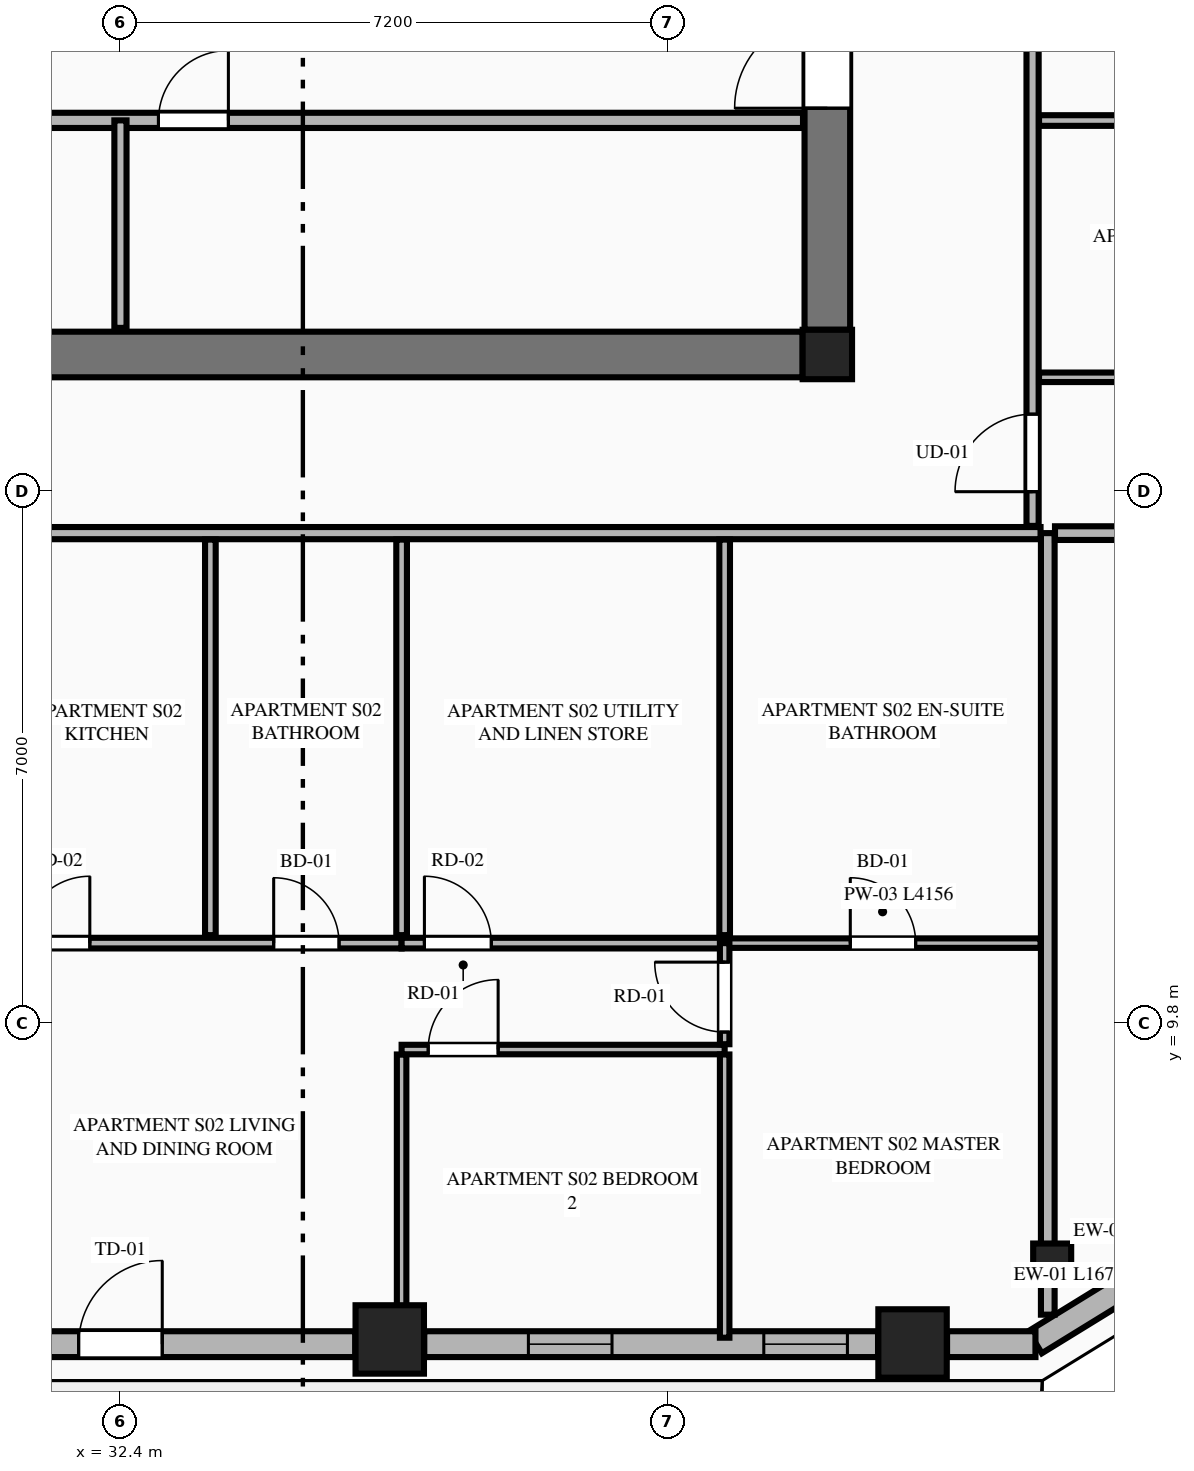
"""IFC4 building model, lengths in metres.
Left out: names, types, materials, properties, quantities, classifications, styles, units other than length and angle.
Written with IfcOpenShell. Run it as: python <this file> out.ifc"""

import sys

from ifc_helpers import new_model, si_unit, direction, frame, frame_2d, origin, origin_2d, place, context, subcontext, project, spatial, rectangle, extrude, element, fill, save


model = new_model("IFC4")
c1 = context("Model", 3, precision=1e-05, world=origin(), true_north=direction((0.0, 1.0)))
c2 = subcontext(c1, "Body", "Model", "MODEL_VIEW")
j1 = project(units=[si_unit("LENGTHUNIT", "METRE"), si_unit("PLANEANGLEUNIT", "RADIAN")], contexts=[c1])
p1 = place(None, origin())
s1 = spatial("IfcSite", under=j1, at=p1, CompositionType="ELEMENT")
p2 = place(p1, origin())
s2 = spatial("IfcBuilding", under=s1, at=p2, CompositionType="ELEMENT")
p3 = place(p2, frame((0.0, 0.0, 175.45)))
s3 = spatial("IfcBuildingStorey", under=s2, at=p3, CompositionType="ELEMENT", Elevation=175.45)
p4 = place(p3, frame((41.7, 18.6, 0.0), z_axis=(0.0, 0.0, 1.0), x_axis=(1.0, 0.0, 0.0)))
e1 = element("IfcColumn", 1, at=p4, inside=s3, PredefinedType="COLUMN", context=c2, shape_type="SweptSolid", body=[
    extrude(rectangle(XDim=0.65, YDim=0.65, at=origin_2d()), origin(), (0.0, 0.0, 1.0), 3.55),
])
p5 = place(p3, frame((23.425, 18.6, 0.0), z_axis=(0.0, 0.0, 1.0), x_axis=(1.0, 0.0, 0.0)))
e2 = element("IfcWall", 2, at=p5, inside=s3, PredefinedType="SHEAR", context=c2, shape_type="SweptSolid", body=[
    extrude(rectangle(XDim=17.95, YDim=0.6, at=frame_2d((8.975, 0.0))), origin(), (0.0, 0.0, 1.0), 3.35),
])
p6 = place(p3, frame((41.7, 18.925, 0.0), z_axis=(0.0, 0.0, 1.0), x_axis=(0.0, 1.0, 0.0)))
e3 = element("IfcWall", 3, at=p6, inside=s3, PredefinedType="SHEAR", context=c2, shape_type="SweptSolid", body=[
    extrude(rectangle(XDim=13.95, YDim=0.6, at=frame_2d((6.975, 0.0))), origin(), (0.0, 0.0, 1.0), 3.35),
])
p7 = place(p6, frame((2.915, 0.0, 0.0)))
e4 = element("IfcOpeningElement", 4, at=p7, cuts=e3, PredefinedType="OPENING", context=c2, shape_type="SweptSolid", body=[
    extrude(rectangle(XDim=1.22, YDim=2.25, at=frame_2d((0.61, 1.125))), frame((0.0, 0.31, 0.0), z_axis=(0.0, -1.0, 0.0), x_axis=(1.0, 0.0, 0.0)), (0.0, 0.0, 1.0), 0.62),
])
for number, where, z_axis, x_axis in (
    (5, (35.943, 5.642, 0.0), (0.0, 0.0, 1.0), (1.0, 0.0, 0.0)),
    (6, (42.821, 5.589, 0.0), (0.0, 0.0, 1.0), (1.0, 0.0, 0.0)),
):
    element("IfcColumn", number, at=place(p3, frame(where, z_axis=z_axis, x_axis=x_axis)), inside=s3, PredefinedType="COLUMN", context=c2, shape_type="SweptSolid", body=[
        extrude(rectangle(XDim=0.9, YDim=0.9, at=origin_2d()), origin(), (0.0, 0.0, 1.0), 3.55),
    ])
p8 = place(p3, frame((44.658, 6.654, 0.0), z_axis=(0.0, 0.0, 1.0), x_axis=(0.865230187018, 0.501374833306, 0.0)))
e7 = element("IfcColumn", 7, at=p8, inside=s3, PredefinedType="PILASTER", context=c2, shape_type="SweptSolid", body=[
    extrude(rectangle(XDim=0.5, YDim=0.35, at=origin_2d()), origin(), (0.0, 0.0, 1.0), 3.55),
])
p9 = place(p3, frame((23.42, 21.68, 0.0), z_axis=(0.0, 0.0, 1.0), x_axis=(1.0, 0.0, 0.0)))
e8 = element("IfcWall", 8, at=p9, inside=s3, PredefinedType="PLUMBINGWALL", context=c2, shape_type="SweptSolid", body=[
    extrude(rectangle(XDim=17.96, YDim=0.2, at=frame_2d((8.98, 0.0))), origin(), (0.0, 0.0, 1.0), 3.35),
])
p10 = place(p9, frame((0.46, 0.0, 0.0)))
e9 = element("IfcOpeningElement", 9, at=p10, cuts=e8, PredefinedType="OPENING", context=c2, shape_type="SweptSolid", body=[
    extrude(rectangle(XDim=0.92, YDim=2.15, at=frame_2d((0.46, 1.075))), frame((0.0, 0.11, 0.0), z_axis=(0.0, -1.0, 0.0), x_axis=(1.0, 0.0, 0.0)), (0.0, 0.0, 1.0), 0.22),
])
p11 = place(p9, frame((9.48, 0.0, 0.0)))
e10 = element("IfcOpeningElement", 10, at=p11, cuts=e8, PredefinedType="OPENING", context=c2, shape_type="SweptSolid", body=[
    extrude(rectangle(XDim=0.92, YDim=2.15, at=frame_2d((0.46, 1.075))), frame((0.0, 0.11, 0.0), z_axis=(0.0, -1.0, 0.0), x_axis=(1.0, 0.0, 0.0)), (0.0, 0.0, 1.0), 0.22),
])
p12 = place(p3, frame((32.4, 18.95, 0.0), z_axis=(0.0, 0.0, 1.0), x_axis=(0.0, 1.0, 0.0)))
e11 = element("IfcWall", 11, at=p12, inside=s3, PredefinedType="PARTITIONING", context=c2, shape_type="SweptSolid", body=[
    extrude(rectangle(XDim=2.73, YDim=0.16, at=frame_2d((1.365, 0.0))), origin(), (0.0, 0.0, 1.0), 3.35),
])
p13 = place(p3, frame((44.433, 5.605, 0.0), z_axis=(0.0, 0.0, 1.0), x_axis=(0.851778214877, 0.523902541185, 0.0)))
e12 = element("IfcWall", 12, at=p13, inside=s3, PredefinedType="STANDARD", context=c2, shape_type="SweptSolid", body=[
    extrude(rectangle(XDim=1.678, YDim=0.34, at=frame_2d((0.839, 0.0))), origin(), (0.0, 0.0, 1.0), 3.35),
])
p14 = place(p3, frame((29.311, 5.58, 0.0), z_axis=(0.0, 0.0, 1.0), x_axis=(1.0, 0.0, 0.0)))
e13 = element("IfcWall", 13, at=p14, inside=s3, PredefinedType="STANDARD", context=c2, shape_type="SweptSolid", body=[
    extrude(rectangle(XDim=6.178, YDim=0.34, at=frame_2d((3.089, 0.0))), origin(), (0.0, 0.0, 1.0), 2.883),
])
p15 = place(p14, frame((2.539, 0.0, 0.0)))
e14 = element("IfcOpeningElement", 14, at=p15, cuts=e13, PredefinedType="OPENING", context=c2, shape_type="SweptSolid", body=[
    extrude(rectangle(XDim=1.1, YDim=2.25, at=frame_2d((0.55, 1.125))), frame((0.0, 0.18, 0.0), z_axis=(0.0, -1.0, 0.0), x_axis=(1.0, 0.0, 0.0)), (0.0, 0.0, 1.0), 0.36),
])
p16 = place(p3, frame((36.397, 5.58, 0.0), z_axis=(0.0, 0.0, 1.0), x_axis=(1.0, 0.0, 0.0)))
e15 = element("IfcWall", 15, at=p16, inside=s3, PredefinedType="STANDARD", context=c2, shape_type="SweptSolid", body=[
    extrude(rectangle(XDim=5.97, YDim=0.34, at=frame_2d((2.985, 0.0))), origin(), (0.0, 0.0, 1.0), 2.883),
])
p17 = place(p16, frame((1.37, 0.0, 0.75)))
e16 = element("IfcOpeningElement", 16, at=p17, cuts=e15, PredefinedType="OPENING", context=c2, shape_type="SweptSolid", body=[
    extrude(rectangle(XDim=1.1, YDim=1.983, at=frame_2d((0.55, 0.991))), frame((0.0, 0.18, 0.0), z_axis=(0.0, -1.0, 0.0), x_axis=(1.0, 0.0, 0.0)), (0.0, 0.0, 1.0), 0.36),
])
p18 = place(p16, frame((4.467, 0.0, 0.75)))
e17 = element("IfcOpeningElement", 17, at=p18, cuts=e15, PredefinedType="OPENING", context=c2, shape_type="SweptSolid", body=[
    extrude(rectangle(XDim=1.1, YDim=1.983, at=frame_2d((0.55, 0.991))), frame((0.0, 0.18, 0.0), z_axis=(0.0, -1.0, 0.0), x_axis=(1.0, 0.0, 0.0)), (0.0, 0.0, 1.0), 0.36),
])
p19 = place(p3, frame((43.275, 5.58, 0.0), z_axis=(0.0, 0.0, 1.0), x_axis=(1.0, 0.0, 0.0)))
e18 = element("IfcWall", 18, at=p19, inside=s3, PredefinedType="STANDARD", context=c2, shape_type="SweptSolid", body=[
    extrude(rectangle(XDim=1.163, YDim=0.34, at=frame_2d((0.582, 0.0))), origin(), (0.0, 0.0, 1.0), 3.35),
])
p20 = place(p3, frame((44.6, 5.968, 0.0), z_axis=(0.0, 0.0, 1.0), x_axis=(0.0, 1.0, 0.0)))
e19 = element("IfcWall", 19, at=p20, inside=s3, PredefinedType="PARTITIONING", context=c2, shape_type="SweptSolid", body=[
    extrude(rectangle(XDim=10.282, YDim=0.18, at=frame_2d((5.141, 0.0))), origin(), (0.0, 0.0, 1.0), 3.35),
])
p21 = place(p3, frame((28.952, 16.25, 0.0), z_axis=(0.0, 0.0, 1.0), x_axis=(1.0, 0.0, 0.0)))
e20 = element("IfcWall", 20, at=p21, inside=s3, PredefinedType="PARTITIONING", context=c2, shape_type="SweptSolid", body=[
    extrude(rectangle(XDim=15.553, YDim=0.16, at=frame_2d((7.776, 0.0))), origin(), (0.0, 0.0, 1.0), 3.35),
])
p22 = place(p21, frame((0.355, 0.0, 0.0)))
e21 = element("IfcOpeningElement", 21, at=p22, cuts=e20, PredefinedType="OPENING", context=c2, shape_type="SweptSolid", body=[
    extrude(rectangle(XDim=1.02, YDim=2.25, at=frame_2d((0.51, 1.125))), frame((0.0, 0.09, 0.0), z_axis=(0.0, -1.0, 0.0), x_axis=(1.0, 0.0, 0.0)), (0.0, 0.0, 1.0), 0.18),
])
p23 = place(p3, frame((30.857, 10.856, 0.0), z_axis=(0.0, 0.0, 1.0), x_axis=(1.0, 0.0, 0.0)))
e22 = element("IfcWall", 22, at=p23, inside=s3, PredefinedType="PLUMBINGWALL", context=c2, shape_type="SweptSolid", body=[
    extrude(rectangle(XDim=5.242, YDim=0.14, at=frame_2d((2.621, 0.0))), origin(), (0.0, 0.0, 1.0), 3.35),
])
p24 = place(p23, frame((3.559, 0.0, 0.0)))
e23 = element("IfcOpeningElement", 23, at=p24, cuts=e22, PredefinedType="OPENING", context=c2, shape_type="SweptSolid", body=[
    extrude(rectangle(XDim=0.86, YDim=2.1, at=frame_2d((0.43, 1.05))), frame((0.0, 0.08, 0.0), z_axis=(0.0, -1.0, 0.0), x_axis=(1.0, 0.0, 0.0)), (0.0, 0.0, 1.0), 0.16),
])
p25 = place(p23, frame((0.26, 0.0, 0.0)))
e24 = element("IfcOpeningElement", 24, at=p25, cuts=e22, PredefinedType="OPENING", context=c2, shape_type="SweptSolid", body=[
    extrude(rectangle(XDim=0.88, YDim=2.15, at=frame_2d((0.44, 1.075))), frame((0.0, 0.08, 0.0), z_axis=(0.0, -1.0, 0.0), x_axis=(1.0, 0.0, 0.0)), (0.0, 0.0, 1.0), 0.16),
])
p26 = place(p3, frame((36.099, 10.856, 0.0), z_axis=(0.0, 0.0, 1.0), x_axis=(1.0, 0.0, 0.0)))
e25 = element("IfcWall", 25, at=p26, inside=s3, PredefinedType="PLUMBINGWALL", context=c2, shape_type="SweptSolid", body=[
    extrude(rectangle(XDim=4.25, YDim=0.14, at=frame_2d((2.125, 0.0))), origin(), (0.0, 0.0, 1.0), 3.35),
])
p27 = place(p26, frame((0.3, 0.0, 0.0)))
e26 = element("IfcOpeningElement", 26, at=p27, cuts=e25, PredefinedType="OPENING", context=c2, shape_type="SweptSolid", body=[
    extrude(rectangle(XDim=0.88, YDim=2.15, at=frame_2d((0.44, 1.075))), frame((0.0, 0.08, 0.0), z_axis=(0.0, -1.0, 0.0), x_axis=(1.0, 0.0, 0.0)), (0.0, 0.0, 1.0), 0.16),
])
p28 = place(p3, frame((40.349, 10.856, 0.0), z_axis=(0.0, 0.0, 1.0), x_axis=(1.0, 0.0, 0.0)))
e27 = element("IfcWall", 27, at=p28, inside=s3, PredefinedType="PARTITIONING", context=c2, shape_type="SweptSolid", body=[
    extrude(rectangle(XDim=4.156, YDim=0.125, at=frame_2d((2.078, 0.0))), origin(), (0.0, 0.0, 1.0), 3.35),
])
p29 = place(p28, frame((1.653, 0.0, 0.0)))
e28 = element("IfcOpeningElement", 28, at=p29, cuts=e27, PredefinedType="OPENING", context=c2, shape_type="SweptSolid", body=[
    extrude(rectangle(XDim=0.86, YDim=2.1, at=frame_2d((0.43, 1.05))), frame((0.0, 0.073, 0.0), z_axis=(0.0, -1.0, 0.0), x_axis=(1.0, 0.0, 0.0)), (0.0, 0.0, 1.0), 0.145),
])
p30 = place(p3, frame((33.583, 10.961, 0.0), z_axis=(0.0, 0.0, 1.0), x_axis=(0.0, 1.0, 0.0)))
e29 = element("IfcWall", 29, at=p30, inside=s3, PredefinedType="PLUMBINGWALL", context=c2, shape_type="SweptSolid", body=[
    extrude(rectangle(XDim=5.204, YDim=0.14, at=frame_2d((2.602, 0.0))), origin(), (0.0, 0.0, 1.0), 3.35),
])
p31 = place(p3, frame((36.099, 5.665, 0.0), z_axis=(0.0, 0.0, 1.0), x_axis=(0.0, 1.0, 0.0)))
e30 = element("IfcWall", 30, at=p31, inside=s3, PredefinedType="PARTITIONING", context=c2, shape_type="SweptSolid", body=[
    extrude(rectangle(XDim=3.726, YDim=0.125, at=frame_2d((1.863, 0.0))), origin(), (0.0, 0.0, 1.0), 3.35),
])
p32 = place(p3, frame((36.099, 9.456, 0.0), z_axis=(0.0, 0.0, 1.0), x_axis=(1.0, 0.0, 0.0)))
e31 = element("IfcWall", 31, at=p32, inside=s3, PredefinedType="PARTITIONING", context=c2, shape_type="SweptSolid", body=[
    extrude(rectangle(XDim=4.25, YDim=0.125, at=frame_2d((2.125, 0.0))), origin(), (0.0, 0.0, 1.0), 3.35),
])
p33 = place(p32, frame((0.35, 0.0, 0.0)))
e32 = element("IfcOpeningElement", 32, at=p33, cuts=e31, PredefinedType="OPENING", context=c2, shape_type="SweptSolid", body=[
    extrude(rectangle(XDim=0.92, YDim=2.15, at=frame_2d((0.46, 1.075))), frame((0.0, 0.073, 0.0), z_axis=(0.0, -1.0, 0.0), x_axis=(1.0, 0.0, 0.0)), (0.0, 0.0, 1.0), 0.145),
])
p34 = place(p3, frame((40.349, 9.526, 0.0), z_axis=(0.0, 0.0, 1.0), x_axis=(0.0, 1.0, 0.0)))
e33 = element("IfcWall", 33, at=p34, inside=s3, PredefinedType="PARTITIONING", context=c2, shape_type="SweptSolid", body=[
    extrude(rectangle(XDim=1.33, YDim=0.125, at=frame_2d((0.665, 0.0))), origin(), (0.0, 0.0, 1.0), 3.35),
])
p35 = place(p34, frame((0.16, 0.0, 0.0)))
e34 = element("IfcOpeningElement", 34, at=p35, cuts=e33, PredefinedType="OPENING", context=c2, shape_type="SweptSolid", body=[
    extrude(rectangle(XDim=0.92, YDim=2.15, at=frame_2d((0.46, 1.075))), frame((0.0, 0.073, 0.0), z_axis=(0.0, -1.0, 0.0), x_axis=(1.0, 0.0, 0.0)), (0.0, 0.0, 1.0), 0.145),
])
for number, where, z_axis, x_axis in (
    (35, (36.099, 10.961, 0.0), (0.0, 0.0, 1.0), (0.0, 1.0, 0.0)),
    (36, (40.349, 10.961, 0.0), (0.0, 0.0, 1.0), (0.0, 1.0, 0.0)),
):
    element("IfcWall", number, at=place(p3, frame(where, z_axis=z_axis, x_axis=x_axis)), inside=s3, PredefinedType="PLUMBINGWALL", context=c2, shape_type="SweptSolid", body=[
        extrude(rectangle(XDim=5.204, YDim=0.14, at=frame_2d((2.602, 0.0))), origin(), (0.0, 0.0, 1.0), 3.35),
    ])
p36 = place(p3, frame((40.349, 5.665, 0.0), z_axis=(0.0, 0.0, 1.0), x_axis=(0.0, 1.0, 0.0)))
e37 = element("IfcWall", 37, at=p36, inside=s3, PredefinedType="PARTITIONING", context=c2, shape_type="SweptSolid", body=[
    extrude(rectangle(XDim=3.726, YDim=0.125, at=frame_2d((1.863, 0.0))), origin(), (0.0, 0.0, 1.0), 3.35),
])
p37 = place(p3, frame((44.695, 16.25, 0.0), z_axis=(0.0, 0.0, 1.0), x_axis=(1.0, 0.0, 0.0)))
e38 = element("IfcWall", 38, at=p37, inside=s3, PredefinedType="PARTITIONING", context=c2, shape_type="SweptSolid", body=[
    extrude(rectangle(XDim=5.894, YDim=0.18, at=frame_2d((2.947, 0.0))), origin(), (0.0, 0.0, 1.0), 3.35),
])
p38 = place(p3, frame((44.4, 16.345, 0.0), z_axis=(0.0, 0.0, 1.0), x_axis=(0.0, 1.0, 0.0)))
e39 = element("IfcWall", 39, at=p38, inside=s3, PredefinedType="PARTITIONING", context=c2, shape_type="SweptSolid", body=[
    extrude(rectangle(XDim=18.71, YDim=0.16, at=frame_2d((9.355, 0.0))), origin(), (0.0, 0.0, 1.0), 3.35),
])
p39 = place(p38, frame((0.45, 0.0, 0.0)))
e40 = element("IfcOpeningElement", 40, at=p39, cuts=e39, PredefinedType="OPENING", context=c2, shape_type="SweptSolid", body=[
    extrude(rectangle(XDim=1.02, YDim=2.25, at=frame_2d((0.51, 1.125))), frame((0.0, 0.09, 0.0), z_axis=(0.0, -1.0, 0.0), x_axis=(1.0, 0.0, 0.0)), (0.0, 0.0, 1.0), 0.18),
])
p40 = place(p3, frame((44.485, 18.3, 0.0), z_axis=(0.0, 0.0, 1.0), x_axis=(1.0, 0.0, 0.0)))
e41 = element("IfcWall", 41, at=p40, inside=s3, PredefinedType="PARTITIONING", context=c2, shape_type="SweptSolid", body=[
    extrude(rectangle(XDim=3.68, YDim=0.125, at=frame_2d((1.84, 0.0))), origin(), (0.0, 0.0, 1.0), 2.807),
])
p41 = place(p3, frame((44.485, 21.678, 0.0), z_axis=(0.0, 0.0, 1.0), x_axis=(1.0, 0.0, 0.0)))
e42 = element("IfcWall", 42, at=p41, inside=s3, PredefinedType="PLUMBINGWALL", context=c2, shape_type="SweptSolid", body=[
    extrude(rectangle(XDim=3.68, YDim=0.14, at=frame_2d((1.84, 0.0))), origin(), (0.0, 0.0, 1.0), 3.35),
])
p42 = place(p7, origin())
e43 = element("IfcDoor", 43, at=p42, inside=s3, OperationType="SINGLE_SWING_LEFT", PredefinedType="DOOR", context=c2, shape_type="SweptSolid", body=[
    extrude(rectangle(XDim=1.22, YDim=2.25, at=frame_2d((0.61, 1.125))), frame((0.0, 0.025, 0.0), z_axis=(0.0, -1.0, 0.0), x_axis=(1.0, 0.0, 0.0)), (0.0, 0.0, 1.0), 0.05),
])
fill(e4, e43)
p43 = place(p11, origin())
e44 = element("IfcDoor", 44, at=p43, inside=s3, OperationType="SINGLE_SWING_RIGHT", PredefinedType="DOOR", context=c2, shape_type="SweptSolid", body=[
    extrude(rectangle(XDim=0.92, YDim=2.15, at=frame_2d((0.46, 1.075))), frame((0.0, 0.025, 0.0), z_axis=(0.0, -1.0, 0.0), x_axis=(1.0, 0.0, 0.0)), (0.0, 0.0, 1.0), 0.05),
])
fill(e10, e44)
p44 = place(p15, origin())
e45 = element("IfcDoor", 45, at=p44, inside=s3, OperationType="SINGLE_SWING_RIGHT", PredefinedType="DOOR", context=c2, shape_type="SweptSolid", body=[
    extrude(rectangle(XDim=1.1, YDim=2.25, at=frame_2d((0.55, 1.125))), frame((0.0, 0.025, 0.0), z_axis=(0.0, -1.0, 0.0), x_axis=(1.0, 0.0, 0.0)), (0.0, 0.0, 1.0), 0.05),
])
fill(e14, e45)
p45 = place(p17, origin())
e46 = element("IfcWindow", 46, at=p45, inside=s3, PartitioningType="SINGLE_PANEL", PredefinedType="WINDOW", context=c2, shape_type="SweptSolid", body=[
    extrude(rectangle(XDim=1.1, YDim=1.983, at=frame_2d((0.55, 0.991))), frame((0.0, 0.03, 0.0), z_axis=(0.0, -1.0, 0.0), x_axis=(1.0, 0.0, 0.0)), (0.0, 0.0, 1.0), 0.06),
])
fill(e16, e46)
p46 = place(p24, origin())
e47 = element("IfcDoor", 47, at=p46, inside=s3, OperationType="SINGLE_SWING_LEFT", PredefinedType="DOOR", context=c2, shape_type="SweptSolid", body=[
    extrude(rectangle(XDim=0.86, YDim=2.1, at=frame_2d((0.43, 1.05))), frame((0.0, 0.025, 0.0), z_axis=(0.0, -1.0, 0.0), x_axis=(1.0, 0.0, 0.0)), (0.0, 0.0, 1.0), 0.05),
])
fill(e23, e47)
p47 = place(p29, origin())
e48 = element("IfcDoor", 48, at=p47, inside=s3, OperationType="SINGLE_SWING_LEFT", PredefinedType="DOOR", context=c2, shape_type="SweptSolid", body=[
    extrude(rectangle(XDim=0.86, YDim=2.1, at=frame_2d((0.43, 1.05))), frame((0.0, 0.025, 0.0), z_axis=(0.0, -1.0, 0.0), x_axis=(1.0, 0.0, 0.0)), (0.0, 0.0, 1.0), 0.05),
])
fill(e28, e48)
p48 = place(p25, origin())
e49 = element("IfcDoor", 49, at=p48, inside=s3, OperationType="SINGLE_SWING_RIGHT", PredefinedType="DOOR", context=c2, shape_type="SweptSolid", body=[
    extrude(rectangle(XDim=0.88, YDim=2.15, at=frame_2d((0.44, 1.075))), frame((0.0, 0.025, 0.0), z_axis=(0.0, -1.0, 0.0), x_axis=(1.0, 0.0, 0.0)), (0.0, 0.0, 1.0), 0.05),
])
fill(e24, e49)
p49 = place(p27, origin())
e50 = element("IfcDoor", 50, at=p49, inside=s3, OperationType="SINGLE_SWING_LEFT", PredefinedType="DOOR", context=c2, shape_type="SweptSolid", body=[
    extrude(rectangle(XDim=0.88, YDim=2.15, at=frame_2d((0.44, 1.075))), frame((0.0, 0.025, 0.0), z_axis=(0.0, -1.0, 0.0), x_axis=(1.0, 0.0, 0.0)), (0.0, 0.0, 1.0), 0.05),
])
fill(e26, e50)
p50 = place(p33, origin())
e51 = element("IfcDoor", 51, at=p50, inside=s3, OperationType="SINGLE_SWING_RIGHT", PredefinedType="DOOR", context=c2, shape_type="SweptSolid", body=[
    extrude(rectangle(XDim=0.92, YDim=2.15, at=frame_2d((0.46, 1.075))), frame((0.0, 0.025, 0.0), z_axis=(0.0, -1.0, 0.0), x_axis=(1.0, 0.0, 0.0)), (0.0, 0.0, 1.0), 0.05),
])
fill(e32, e51)
p51 = place(p35, origin())
e52 = element("IfcDoor", 52, at=p51, inside=s3, OperationType="SINGLE_SWING_RIGHT", PredefinedType="DOOR", context=c2, shape_type="SweptSolid", body=[
    extrude(rectangle(XDim=0.92, YDim=2.15, at=frame_2d((0.46, 1.075))), frame((0.0, 0.025, 0.0), z_axis=(0.0, -1.0, 0.0), x_axis=(1.0, 0.0, 0.0)), (0.0, 0.0, 1.0), 0.05),
])
fill(e34, e52)
p52 = place(p39, origin())
e53 = element("IfcDoor", 53, at=p52, inside=s3, OperationType="SINGLE_SWING_LEFT", PredefinedType="DOOR", context=c2, shape_type="SweptSolid", body=[
    extrude(rectangle(XDim=1.02, YDim=2.25, at=frame_2d((0.51, 1.125))), frame((0.0, 0.025, 0.0), z_axis=(0.0, -1.0, 0.0), x_axis=(1.0, 0.0, 0.0)), (0.0, 0.0, 1.0), 0.05),
])
fill(e40, e53)
p53 = place(p18, origin())
e54 = element("IfcWindow", 54, at=p53, inside=s3, PartitioningType="SINGLE_PANEL", PredefinedType="WINDOW", context=c2, shape_type="SweptSolid", body=[
    extrude(rectangle(XDim=1.1, YDim=1.983, at=frame_2d((0.55, 0.991))), frame((0.0, 0.03, 0.0), z_axis=(0.0, -1.0, 0.0), x_axis=(1.0, 0.0, 0.0)), (0.0, 0.0, 1.0), 0.06),
])
fill(e17, e54)
save(model, sys.argv[1])
